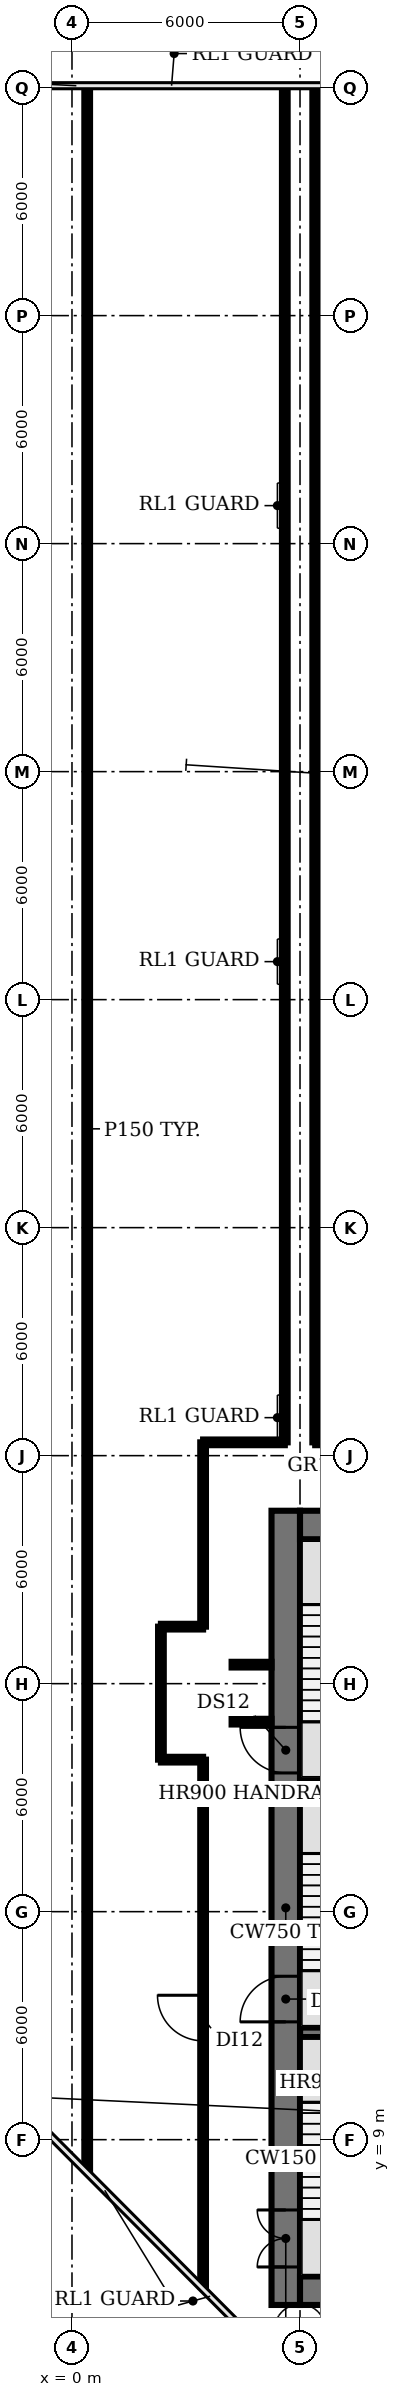
"""IFC4 building model, lengths in metres.
Left out: names, types, materials, properties, quantities, classifications, styles, units other than length and angle.
Written with IfcOpenShell. Run it as: python <this file> out.ifc"""

import sys

from ifc_helpers import new_model, si_unit, direction, frame, frame_2d, origin, place, context, subcontext, project, spatial, rectangle, extrude, element, fill, save


model = new_model("IFC4")
c1 = context("Model", 3, precision=1e-05, world=origin(), true_north=direction((0.0, 1.0)))
c2 = subcontext(c1, "Body", "Model", "MODEL_VIEW")
j1 = project(units=[si_unit("LENGTHUNIT", "METRE"), si_unit("PLANEANGLEUNIT", "RADIAN")], contexts=[c1])
p1 = place(None, origin())
s1 = spatial("IfcSite", under=j1, at=p1, CompositionType="ELEMENT")
p2 = place(p1, origin())
s2 = spatial("IfcBuilding", under=s1, at=p2, CompositionType="ELEMENT")
p3 = place(p2, frame((0.0, 0.0, 138.2)))
s3 = spatial("IfcBuildingStorey", under=s2, at=p3, CompositionType="ELEMENT", Elevation=138.2)
for number, where, z_axis, x_axis in (
    (1, (6.0, 11.825, 0.0), (0.0, 0.0, 1.0), (1.0, 0.0, 0.0)),
    (2, (6.0, 18.375, 0.0), (0.0, 0.0, 1.0), (1.0, 0.0, 0.0)),
):
    element("IfcWall", number, at=place(p3, frame(where, z_axis=z_axis, x_axis=x_axis)), inside=s3, PredefinedType="SHEAR", context=c2, shape_type="SweptSolid", body=[
        extrude(rectangle(XDim=3.15, YDim=0.25, at=frame_2d((1.575, 0.0))), origin(), (0.0, 0.0, 1.0), 8.05),
    ])
p4 = place(p3, frame((5.625, 4.65, 0.0), z_axis=(0.0, 0.0, 1.0), x_axis=(0.0, 1.0, 0.0)))
e3 = element("IfcWall", 3, at=p4, inside=s3, PredefinedType="SHEAR", context=c2, shape_type="SweptSolid", body=[
    extrude(rectangle(XDim=20.9, YDim=0.75, at=frame_2d((10.45, 0.0))), origin(), (0.0, 0.0, 1.0), 8.05),
])
p5 = place(p4, frame((1.0, 0.0, 0.0)))
e4 = element("IfcOpeningElement", 4, at=p5, cuts=e3, PredefinedType="OPENING", context=c2, shape_type="SweptSolid", body=[
    extrude(rectangle(XDim=1.5, YDim=2.1, at=frame_2d((0.75, 1.05))), frame((0.0, 0.385, 0.0), z_axis=(0.0, -1.0, 0.0), x_axis=(1.0, 0.0, 0.0)), (0.0, 0.0, 1.0), 0.77),
])
p6 = place(p4, frame((7.45, 0.0, 0.0)))
e5 = element("IfcOpeningElement", 5, at=p6, cuts=e3, PredefinedType="OPENING", context=c2, shape_type="SweptSolid", body=[
    extrude(rectangle(XDim=1.2, YDim=2.1, at=frame_2d((0.6, 1.05))), frame((0.0, 0.385, 0.0), z_axis=(0.0, -1.0, 0.0), x_axis=(1.0, 0.0, 0.0)), (0.0, 0.0, 1.0), 0.77),
])
p7 = place(p4, frame((14.0, 0.0, 0.0)))
e6 = element("IfcOpeningElement", 6, at=p7, cuts=e3, PredefinedType="OPENING", context=c2, shape_type="SweptSolid", body=[
    extrude(rectangle(XDim=1.2, YDim=2.1, at=frame_2d((0.6, 1.05))), frame((0.0, 0.385, 0.0), z_axis=(0.0, -1.0, 0.0), x_axis=(1.0, 0.0, 0.0)), (0.0, 0.0, 1.0), 0.77),
])
p8 = place(p3, frame((24.0, 5.025, 0.0), z_axis=(0.0, 0.0, 1.0), x_axis=(-1.0, 0.0, 0.0)))
e7 = element("IfcWall", 7, at=p8, inside=s3, PredefinedType="SHEAR", context=c2, shape_type="SweptSolid", body=[
    extrude(rectangle(XDim=18.0, YDim=0.75, at=frame_2d((9.0, 0.0))), origin(), (0.0, 0.0, 1.0), 8.05),
])
p9 = place(p8, frame((13.0, 0.0, 0.0)))
e8 = element("IfcOpeningElement", 8, at=p9, cuts=e7, PredefinedType="OPENING", context=c2, shape_type="SweptSolid", body=[
    extrude(rectangle(XDim=1.2, YDim=2.1, at=frame_2d((0.6, 1.05))), frame((0.0, 0.385, 0.0), z_axis=(0.0, -1.0, 0.0), x_axis=(1.0, 0.0, 0.0)), (0.0, 0.0, 1.0), 0.77),
])
p10 = place(p8, frame((3.85, 0.0, 0.0)))
e9 = element("IfcOpeningElement", 9, at=p10, cuts=e7, PredefinedType="OPENING", context=c2, shape_type="SweptSolid", body=[
    extrude(rectangle(XDim=1.0, YDim=2.1, at=frame_2d((0.5, 1.05))), frame((0.0, 0.385, 0.0), z_axis=(0.0, -1.0, 0.0), x_axis=(1.0, 0.0, 0.0)), (0.0, 0.0, 1.0), 0.77),
])
p11 = place(p3, frame((6.0, 25.175, 0.0), z_axis=(0.0, 0.0, 1.0), x_axis=(1.0, 0.0, 0.0)))
e10 = element("IfcWall", 10, at=p11, inside=s3, PredefinedType="SHEAR", context=c2, shape_type="SweptSolid", body=[
    extrude(rectangle(XDim=18.0, YDim=0.75, at=frame_2d((9.0, 0.0))), origin(), (0.0, 0.0, 1.0), 8.05),
])
p12 = place(p3, frame((0.4, 8.2, 0.0), z_axis=(0.0, 0.0, 1.0), x_axis=(0.0, 1.0, 0.0)))
e11 = element("IfcWall", 11, at=p12, inside=s3, PredefinedType="PARTITIONING", context=c2, shape_type="SweptSolid", body=[
    extrude(rectangle(XDim=54.8, YDim=0.15, at=frame_2d((27.4, 0.0))), origin(), (0.0, 0.0, 1.0), 6.33),
])
p13 = place(p3, frame((2.34, 19.0, 0.0), z_axis=(0.0, 0.0, 1.0), x_axis=(0.0, 1.0, 0.0)))
e12 = element("IfcWall", 12, at=p13, inside=s3, PredefinedType="PARTITIONING", context=c2, shape_type="SweptSolid", body=[
    extrude(rectangle(XDim=3.5, YDim=0.15, at=frame_2d((1.75, 0.0))), origin(), (0.0, 0.0, 1.0), 6.33),
])
for number, where, z_axis, x_axis in (
    (13, (2.34, 19.0, 0.0), (0.0, 0.0, 1.0), (1.0, 0.0, 0.0)),
    (14, (2.34, 22.5, 0.0), (0.0, 0.0, 1.0), (1.0, 0.0, 0.0)),
):
    element("IfcWall", number, at=place(p3, frame(where, z_axis=z_axis, x_axis=x_axis)), inside=s3, PredefinedType="PARTITIONING", context=c2, shape_type="SweptSolid", body=[
        extrude(rectangle(XDim=1.11, YDim=0.15, at=frame_2d((0.555, 0.0))), origin(), (0.0, 0.0, 1.0), 6.33),
    ])
p14 = place(p3, frame((3.45, 5.14, 0.0), z_axis=(0.0, 0.0, 1.0), x_axis=(0.0, 1.0, 0.0)))
e15 = element("IfcWall", 15, at=p14, inside=s3, PredefinedType="PARTITIONING", context=c2, shape_type="SweptSolid", body=[
    extrude(rectangle(XDim=13.86, YDim=0.15, at=frame_2d((6.93, 0.0))), origin(), (0.0, 0.0, 1.0), 6.33),
])
p15 = place(p14, frame((6.46, 0.0, 0.0)))
e16 = element("IfcOpeningElement", 16, at=p15, cuts=e15, PredefinedType="OPENING", context=c2, shape_type="SweptSolid", body=[
    extrude(rectangle(XDim=1.2, YDim=2.1, at=frame_2d((0.6, 1.05))), frame((0.0, 0.085, 0.0), z_axis=(0.0, -1.0, 0.0), x_axis=(1.0, 0.0, 0.0)), (0.0, 0.0, 1.0), 0.17),
])
p16 = place(p3, frame((3.45, 22.5, 0.0), z_axis=(0.0, 0.0, 1.0), x_axis=(0.0, 1.0, 0.0)))
e17 = element("IfcWall", 17, at=p16, inside=s3, PredefinedType="PARTITIONING", context=c2, shape_type="SweptSolid", body=[
    extrude(rectangle(XDim=4.85, YDim=0.15, at=frame_2d((2.425, 0.0))), origin(), (0.0, 0.0, 1.0), 6.33),
])
p17 = place(p3, frame((3.45, 27.35, 0.0), z_axis=(0.0, 0.0, 1.0), x_axis=(1.0, 0.0, 0.0)))
e18 = element("IfcWall", 18, at=p17, inside=s3, PredefinedType="PARTITIONING", context=c2, shape_type="SweptSolid", body=[
    extrude(rectangle(XDim=2.15, YDim=0.15, at=frame_2d((1.075, 0.0))), origin(), (0.0, 0.0, 1.0), 6.33),
])
for number, where, z_axis, x_axis in (
    (19, (4.2, 20.0, 0.0), (0.0, 0.0, 1.0), (1.0, 0.0, 0.0)),
    (20, (4.2, 21.5, 0.0), (0.0, 0.0, 1.0), (1.0, 0.0, 0.0)),
):
    element("IfcWall", number, at=place(p3, frame(where, z_axis=z_axis, x_axis=x_axis)), inside=s3, PredefinedType="PARTITIONING", context=c2, shape_type="SweptSolid", body=[
        extrude(rectangle(XDim=1.05, YDim=0.15, at=frame_2d((0.525, 0.0))), origin(), (0.0, 0.0, 1.0), 6.33),
    ])
for number, where, z_axis, x_axis in (
    (21, (5.6, 27.35, 0.0), (0.0, 0.0, 1.0), (0.0, 1.0, 0.0)),
    (22, (6.4, 27.35, 0.0), (0.0, 0.0, 1.0), (0.0, 1.0, 0.0)),
):
    element("IfcWall", number, at=place(p3, frame(where, z_axis=z_axis, x_axis=x_axis)), inside=s3, PredefinedType="PARTITIONING", context=c2, shape_type="SweptSolid", body=[
        extrude(rectangle(XDim=35.65, YDim=0.15, at=frame_2d((17.825, 0.0))), origin(), (0.0, 0.0, 1.0), 6.33),
    ])
p18 = place(p3, frame((6.4, 27.35, 0.0), z_axis=(0.0, 0.0, 1.0), x_axis=(1.0, 0.0, 0.0)))
e23 = element("IfcWall", 23, at=p18, inside=s3, PredefinedType="PARTITIONING", context=c2, shape_type="SweptSolid", body=[
    extrude(rectangle(XDim=11.2, YDim=0.15, at=frame_2d((5.6, 0.0))), origin(), (0.0, 0.0, 1.0), 6.33),
])
p19 = place(p18, frame((5.0, 0.0, 0.0)))
e24 = element("IfcOpeningElement", 24, at=p19, cuts=e23, PredefinedType="OPENING", context=c2, shape_type="SweptSolid", body=[
    extrude(rectangle(XDim=1.2, YDim=2.1, at=frame_2d((0.6, 1.05))), frame((0.0, 0.085, 0.0), z_axis=(0.0, -1.0, 0.0), x_axis=(1.0, 0.0, 0.0)), (0.0, 0.0, 1.0), 0.17),
])
p20 = place(p5, origin())
e25 = element("IfcDoor", 25, at=p20, inside=s3, OperationType="DOUBLE_DOOR_SINGLE_SWING", PredefinedType="DOOR", context=c2, shape_type="SweptSolid", body=[
    extrude(rectangle(XDim=1.5, YDim=2.1, at=frame_2d((0.75, 1.05))), frame((0.0, 0.025, 0.0), z_axis=(0.0, -1.0, 0.0), x_axis=(1.0, 0.0, 0.0)), (0.0, 0.0, 1.0), 0.05),
])
fill(e4, e25)
p21 = place(p6, origin())
e26 = element("IfcDoor", 26, at=p21, inside=s3, OperationType="SINGLE_SWING_LEFT", PredefinedType="DOOR", context=c2, shape_type="SweptSolid", body=[
    extrude(rectangle(XDim=1.2, YDim=2.1, at=frame_2d((0.6, 1.05))), frame((0.0, 0.025, 0.0), z_axis=(0.0, -1.0, 0.0), x_axis=(1.0, 0.0, 0.0)), (0.0, 0.0, 1.0), 0.05),
])
fill(e5, e26)
p22 = place(p7, origin())
e27 = element("IfcDoor", 27, at=p22, inside=s3, OperationType="SINGLE_SWING_RIGHT", PredefinedType="DOOR", context=c2, shape_type="SweptSolid", body=[
    extrude(rectangle(XDim=1.2, YDim=2.1, at=frame_2d((0.6, 1.05))), frame((0.0, 0.025, 0.0), z_axis=(0.0, -1.0, 0.0), x_axis=(1.0, 0.0, 0.0)), (0.0, 0.0, 1.0), 0.05),
])
fill(e6, e27)
p23 = place(p15, origin())
e28 = element("IfcDoor", 28, at=p23, inside=s3, OperationType="SINGLE_SWING_RIGHT", PredefinedType="DOOR", context=c2, shape_type="SweptSolid", body=[
    extrude(rectangle(XDim=1.2, YDim=2.1, at=frame_2d((0.6, 1.05))), frame((0.0, 0.025, 0.0), z_axis=(0.0, -1.0, 0.0), x_axis=(1.0, 0.0, 0.0)), (0.0, 0.0, 1.0), 0.05),
])
fill(e16, e28)
save(model, sys.argv[1])
